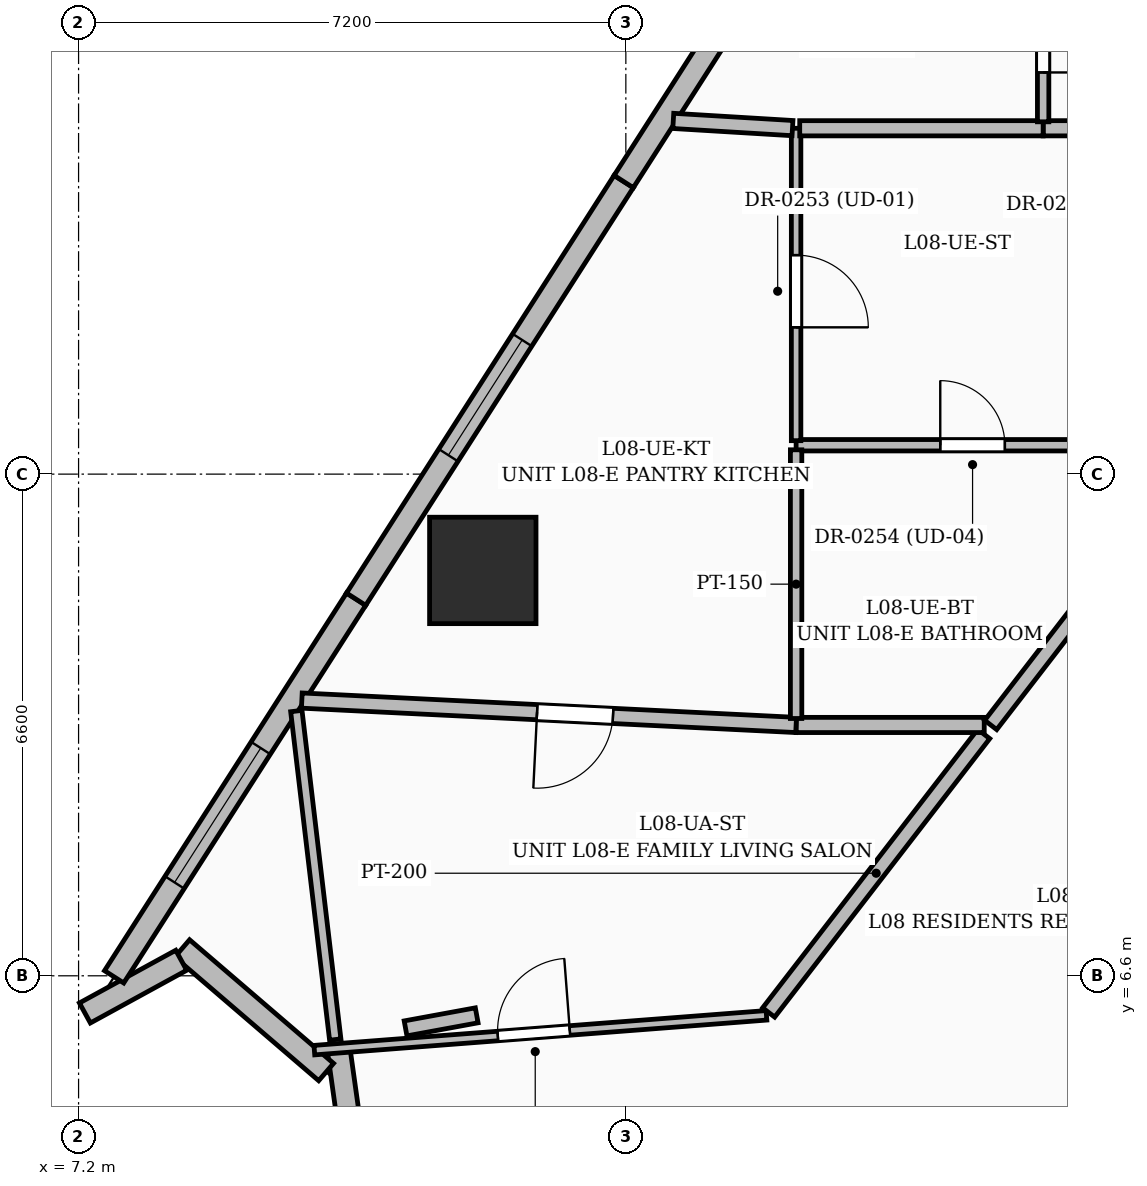
"""IFC4 building model, lengths in metres.
Left out: names, types, materials, properties, quantities, classifications, styles, units other than length and angle.
Written with IfcOpenShell. Run it as: python <this file> out.ifc"""

import sys

from ifc_helpers import new_model, si_unit, direction, frame, frame_2d, origin, origin_2d, place, context, subcontext, project, spatial, rectangle, extrude, element, fill, save


model = new_model("IFC4")
c1 = context("Model", 3, precision=1e-05, world=origin(), true_north=direction((0.0, 1.0)))
c2 = subcontext(c1, "Body", "Model", "MODEL_VIEW")
j1 = project(units=[si_unit("LENGTHUNIT", "METRE"), si_unit("PLANEANGLEUNIT", "RADIAN")], contexts=[c1])
p1 = place(None, origin())
s1 = spatial("IfcSite", under=j1, at=p1, CompositionType="ELEMENT")
p2 = place(p1, origin())
s2 = spatial("IfcBuilding", under=s1, at=p2, CompositionType="ELEMENT")
p3 = place(p2, frame((0.0, 0.0, 39.0)))
s3 = spatial("IfcBuildingStorey", under=s2, at=p3, CompositionType="ELEMENT", Elevation=39.0)
p4 = place(p3, frame((12.518, 11.933, 0.0), z_axis=(0.0, 0.0, 1.0), x_axis=(1.0, 0.0, 0.0)))
e1 = element("IfcColumn", 1, at=p4, inside=s3, PredefinedType="COLUMN", context=c2, shape_type="SweptSolid", body=[
    extrude(rectangle(XDim=1.4, YDim=1.4, at=origin_2d()), origin(), (0.0, 0.0, 1.0), 3.6),
])
p5 = place(p3, frame((11.044, 2.625, 0.0), z_axis=(0.0, 0.0, 1.0), x_axis=(-0.139123594989, 0.99027502509, 0.0)))
e2 = element("IfcWall", 2, at=p5, inside=s3, PredefinedType="SOLIDWALL", context=c2, shape_type="SweptSolid", body=[
    extrude(rectangle(XDim=3.05, YDim=0.3, at=frame_2d((1.525, 0.0))), origin(), (0.0, 0.0, 1.0), 3.35),
])
p6 = place(p5, frame((0.375, 0.0, 0.6)))
e3 = element("IfcOpeningElement", 3, at=p6, cuts=e2, PredefinedType="OPENING", context=c2, shape_type="SweptSolid", body=[
    extrude(rectangle(XDim=1.5, YDim=2.1, at=frame_2d((0.75, 1.05))), frame((0.0, 0.16, 0.0), z_axis=(0.0, -1.0, 0.0), x_axis=(1.0, 0.0, 0.0)), (0.0, 0.0, 1.0), 0.32),
])
p7 = place(p3, frame((10.457, 5.334, 0.0), z_axis=(0.0, 0.0, 1.0), x_axis=(-0.758710972352, 0.651427402273, 0.0)))
e4 = element("IfcWall", 4, at=p7, inside=s3, PredefinedType="SOLIDWALL", context=c2, shape_type="SweptSolid", body=[
    extrude(rectangle(XDim=2.496, YDim=0.3, at=frame_2d((1.248, 0.0))), origin(), (0.0, 0.0, 1.0), 3.35),
])
p8 = place(p3, frame((8.551, 6.804, 0.0), z_axis=(0.0, 0.0, 1.0), x_axis=(-0.877287752989, -0.479964788767, 0.0)))
e5 = element("IfcWall", 5, at=p8, inside=s3, PredefinedType="SOLIDWALL", context=c2, shape_type="SweptSolid", body=[
    extrude(rectangle(XDim=1.445, YDim=0.3, at=frame_2d((0.722, 0.0))), origin(), (0.0, 0.0, 1.0), 3.35),
])
p9 = place(p3, frame((7.668, 6.586, 0.0), z_axis=(0.0, 0.0, 1.0), x_axis=(0.539504449159, 0.841982748836, 0.0)))
e6 = element("IfcWall", 6, at=p9, inside=s3, PredefinedType="SOLIDWALL", context=c2, shape_type="SweptSolid", body=[
    extrude(rectangle(XDim=5.901, YDim=0.3, at=frame_2d((2.95, 0.0))), origin(), (0.0, 0.0, 1.0), 3.35),
])
p10 = place(p9, frame((1.475, 0.0, 0.55)))
e7 = element("IfcOpeningElement", 7, at=p10, cuts=e6, PredefinedType="OPENING", context=c2, shape_type="SweptSolid", body=[
    extrude(rectangle(XDim=2.1, YDim=2.4, at=frame_2d((1.05, 1.2))), frame((0.0, 0.16, 0.0), z_axis=(0.0, -1.0, 0.0), x_axis=(1.0, 0.0, 0.0)), (0.0, 0.0, 1.0), 0.32),
])
p11 = place(p3, frame((10.851, 11.555, 0.0), z_axis=(0.0, 0.0, 1.0), x_axis=(0.539526045631, 0.841968910403, 0.0)))
e8 = element("IfcWall", 8, at=p11, inside=s3, PredefinedType="SOLIDWALL", context=c2, shape_type="SweptSolid", body=[
    extrude(rectangle(XDim=6.526, YDim=0.3, at=frame_2d((3.263, 0.0))), origin(), (0.0, 0.0, 1.0), 3.35),
])
p12 = place(p11, frame((2.25, 0.0, 0.6)))
e9 = element("IfcOpeningElement", 9, at=p12, cuts=e8, PredefinedType="OPENING", context=c2, shape_type="SweptSolid", body=[
    extrude(rectangle(XDim=1.8, YDim=2.1, at=frame_2d((0.9, 1.05))), frame((0.0, 0.16, 0.0), z_axis=(0.0, -1.0, 0.0), x_axis=(1.0, 0.0, 0.0)), (0.0, 0.0, 1.0), 0.32),
])
p13 = place(p3, frame((14.372, 17.049, 0.0), z_axis=(0.0, 0.0, 1.0), x_axis=(0.539499522652, 0.841985905498, 0.0)))
e10 = element("IfcWall", 10, at=p13, inside=s3, PredefinedType="SOLIDWALL", context=c2, shape_type="SweptSolid", body=[
    extrude(rectangle(XDim=6.525, YDim=0.3, at=frame_2d((3.263, 0.0))), origin(), (0.0, 0.0, 1.0), 3.35),
])
p14 = place(p13, frame((4.175, 0.0, 0.8)))
e11 = element("IfcOpeningElement", 11, at=p14, cuts=e10, PredefinedType="OPENING", context=c2, shape_type="SweptSolid", body=[
    extrude(rectangle(XDim=1.2, YDim=1.8, at=frame_2d((0.6, 0.9))), frame((0.0, 0.16, 0.0), z_axis=(0.0, -1.0, 0.0), x_axis=(1.0, 0.0, 0.0)), (0.0, 0.0, 1.0), 0.32),
])
p15 = place(p3, frame((10.302, 5.622, 0.0), z_axis=(0.0, 0.0, 1.0), x_axis=(0.997048464094, 0.076774737046, 0.0)))
e12 = element("IfcWall", 12, at=p15, inside=s3, PredefinedType="PARTITIONING", context=c2, shape_type="SweptSolid", body=[
    extrude(rectangle(XDim=5.966, YDim=0.125, at=frame_2d((2.983, 0.0))), origin(), (0.0, 0.0, 1.0), 2.37),
])
p16 = place(p15, frame((2.421, 0.0, 0.0)))
e13 = element("IfcOpeningElement", 13, at=p16, cuts=e12, PredefinedType="OPENING", context=c2, shape_type="SweptSolid", body=[
    extrude(rectangle(XDim=0.95, YDim=2.2, at=frame_2d((0.475, 1.1))), frame((0.0, 0.072, 0.0), z_axis=(0.0, -1.0, 0.0), x_axis=(1.0, 0.0, 0.0)), (0.0, 0.0, 1.0), 0.145),
])
p17 = place(p3, frame((16.279, 6.118, 0.0), z_axis=(0.0, 0.0, 1.0), x_axis=(0.611231323246, 0.791452000745, 0.0)))
e14 = element("IfcWall", 14, at=p17, inside=s3, PredefinedType="PARTITIONING", context=c2, shape_type="SweptSolid", body=[
    extrude(rectangle(XDim=4.629, YDim=0.2, at=frame_2d((2.314, 0.0))), origin(), (0.0, 0.0, 1.0), 2.279),
])
p18 = place(p3, frame((19.115, 9.9, 0.0), z_axis=(0.0, 0.0, 1.0), x_axis=(-1.0, 0.0, 0.0)))
e15 = element("IfcWall", 15, at=p18, inside=s3, PredefinedType="PARTITIONING", context=c2, shape_type="SweptSolid", body=[
    extrude(rectangle(XDim=2.475, YDim=0.2, at=frame_2d((1.238, 0.0))), origin(), (0.0, 0.0, 1.0), 2.279),
])
p19 = place(p3, frame((16.64, 9.9, 0.0), z_axis=(0.0, 0.0, 1.0), x_axis=(-0.998783560552, 0.049309219933, 0.0)))
e16 = element("IfcWall", 16, at=p19, inside=s3, PredefinedType="PARTITIONING", context=c2, shape_type="SweptSolid", body=[
    extrude(rectangle(XDim=6.511, YDim=0.2, at=frame_2d((3.255, 0.0))), origin(), (0.0, 0.0, 1.0), 2.37),
])
p20 = place(p19, frame((2.412, 0.0, 0.0)))
e17 = element("IfcOpeningElement", 17, at=p20, cuts=e16, PredefinedType="OPENING", context=c2, shape_type="SweptSolid", body=[
    extrude(rectangle(XDim=1.0, YDim=2.2, at=frame_2d((0.5, 1.1))), frame((0.0, 0.11, 0.0), z_axis=(0.0, -1.0, 0.0), x_axis=(1.0, 0.0, 0.0)), (0.0, 0.0, 1.0), 0.22),
])
p21 = place(p3, frame((21.348, 12.683, 0.0), z_axis=(0.0, 0.0, 1.0), x_axis=(-0.611075844668, -0.791572051088, 0.0)))
e18 = element("IfcWall", 18, at=p21, inside=s3, PredefinedType="PARTITIONING", context=c2, shape_type="SweptSolid", body=[
    extrude(rectangle(XDim=3.515, YDim=0.2, at=frame_2d((1.758, 0.0))), origin(), (0.0, 0.0, 1.0), 2.279),
])
p22 = place(p3, frame((16.64, 13.58, 0.0), z_axis=(0.0, 0.0, 1.0), x_axis=(1.0, 0.0, 0.0)))
e19 = element("IfcWall", 19, at=p22, inside=s3, PredefinedType="PARTITIONING", context=c2, shape_type="SweptSolid", body=[
    extrude(rectangle(XDim=4.675, YDim=0.15, at=frame_2d((2.337, 0.0))), origin(), (0.0, 0.0, 1.0), 2.771),
])
p23 = place(p22, frame((1.896, 0.0, 0.0)))
e20 = element("IfcOpeningElement", 20, at=p23, cuts=e19, PredefinedType="OPENING", context=c2, shape_type="SweptSolid", body=[
    extrude(rectangle(XDim=0.85, YDim=2.1, at=frame_2d((0.425, 1.05))), frame((0.0, 0.085, 0.0), z_axis=(0.0, -1.0, 0.0), x_axis=(1.0, 0.0, 0.0)), (0.0, 0.0, 1.0), 0.17),
])
p24 = place(p3, frame((16.64, 17.75, 0.0), z_axis=(0.0, 0.0, 1.0), x_axis=(0.0, -1.0, 0.0)))
e21 = element("IfcWall", 21, at=p24, inside=s3, PredefinedType="PARTITIONING", context=c2, shape_type="SweptSolid", body=[
    extrude(rectangle(XDim=4.11, YDim=0.125, at=frame_2d((2.055, 0.0))), origin(), (0.0, 0.0, 1.0), 3.35),
])
p25 = place(p24, frame((1.669, 0.0, 0.0)))
e22 = element("IfcOpeningElement", 22, at=p25, cuts=e21, PredefinedType="OPENING", context=c2, shape_type="SweptSolid", body=[
    extrude(rectangle(XDim=0.95, YDim=2.2, at=frame_2d((0.475, 1.1))), frame((0.0, 0.072, 0.0), z_axis=(0.0, -1.0, 0.0), x_axis=(1.0, 0.0, 0.0)), (0.0, 0.0, 1.0), 0.145),
])
p26 = place(p3, frame((21.315, 17.75, 0.0), z_axis=(0.0, 0.0, 1.0), x_axis=(-1.0, 0.0, 0.0)))
e23 = element("IfcWall", 23, at=p26, inside=s3, PredefinedType="PARTITIONING", context=c2, shape_type="SweptSolid", body=[
    extrude(rectangle(XDim=1.425, YDim=0.2, at=frame_2d((0.712, 0.0))), origin(), (0.0, 0.0, 1.0), 2.771),
])
p27 = place(p3, frame((19.89, 17.75, 0.0), z_axis=(0.0, 0.0, 1.0), x_axis=(-1.0, 0.0, 0.0)))
e24 = element("IfcWall", 24, at=p27, inside=s3, PredefinedType="PARTITIONING", context=c2, shape_type="SweptSolid", body=[
    extrude(rectangle(XDim=3.202, YDim=0.2, at=frame_2d((1.601, 0.0))), origin(), (0.0, 0.0, 1.0), 3.35),
])
p28 = place(p3, frame((16.64, 13.52, 0.0), z_axis=(0.0, 0.0, 1.0), x_axis=(0.0, -1.0, 0.0)))
e25 = element("IfcWall", 25, at=p28, inside=s3, PredefinedType="PARTITIONING", context=c2, shape_type="SweptSolid", body=[
    extrude(rectangle(XDim=3.535, YDim=0.15, at=frame_2d((1.768, 0.0))), origin(), (0.0, 0.0, 1.0), 2.279),
])
p29 = place(p3, frame((16.593, 17.752, 0.0), z_axis=(0.0, 0.0, 1.0), x_axis=(-0.998181550188, 0.060279290502, 0.0)))
e26 = element("IfcWall", 26, at=p29, inside=s3, PredefinedType="PARTITIONING", context=c2, shape_type="SweptSolid", body=[
    extrude(rectangle(XDim=1.572, YDim=0.2, at=frame_2d((0.786, 0.0))), origin(), (0.0, 0.0, 1.0), 2.37),
])
p30 = place(p3, frame((19.89, 19.95, 0.0), z_axis=(0.0, 0.0, 1.0), x_axis=(0.0, -1.0, 0.0)))
e27 = element("IfcWall", 27, at=p30, inside=s3, PredefinedType="PARTITIONING", context=c2, shape_type="SweptSolid", body=[
    extrude(rectangle(XDim=2.115, YDim=0.15, at=frame_2d((1.058, 0.0))), origin(), (0.0, 0.0, 1.0), 3.35),
])
p31 = place(p30, frame((0.615, 0.0, 0.0)))
e28 = element("IfcOpeningElement", 28, at=p31, cuts=e27, PredefinedType="OPENING", context=c2, shape_type="SweptSolid", body=[
    extrude(rectangle(XDim=0.85, YDim=2.1, at=frame_2d((0.425, 1.05))), frame((0.0, 0.085, 0.0), z_axis=(0.0, -1.0, 0.0), x_axis=(1.0, 0.0, 0.0)), (0.0, 0.0, 1.0), 0.17),
])
p32 = place(p3, frame((11.502, 5.908, 0.0), z_axis=(0.0, 0.0, 1.0), x_axis=(0.983510869315, 0.180849025265, 0.0)))
e29 = element("IfcWall", 29, at=p32, inside=s3, PredefinedType="PARTITIONING", context=c2, shape_type="SweptSolid", body=[
    extrude(rectangle(XDim=0.952, YDim=0.2, at=frame_2d((0.476, 0.0))), origin(), (0.0, 0.0, 1.0), 3.35),
])
p33 = place(p3, frame((10.577, 5.761, 0.0), z_axis=(0.0, 0.0, 1.0), x_axis=(-0.117632098524, 0.993057243766, 0.0)))
e30 = element("IfcWall", 30, at=p33, inside=s3, PredefinedType="PARTITIONING", context=c2, shape_type="SweptSolid", body=[
    extrude(rectangle(XDim=4.352, YDim=0.15, at=frame_2d((2.176, 0.0))), origin(), (0.0, 0.0, 1.0), 3.35),
])
p34 = place(p10, origin())
e31 = element("IfcWindow", 31, at=p34, inside=s3, PartitioningType="SINGLE_PANEL", PredefinedType="WINDOW", context=c2, shape_type="SweptSolid", body=[
    extrude(rectangle(XDim=2.1, YDim=2.4, at=frame_2d((1.05, 1.2))), frame((0.0, 0.03, 0.0), z_axis=(0.0, -1.0, 0.0), x_axis=(1.0, 0.0, 0.0)), (0.0, 0.0, 1.0), 0.06),
])
fill(e7, e31)
p35 = place(p12, origin())
e32 = element("IfcWindow", 32, at=p35, inside=s3, PartitioningType="SINGLE_PANEL", PredefinedType="WINDOW", context=c2, shape_type="SweptSolid", body=[
    extrude(rectangle(XDim=1.8, YDim=2.1, at=frame_2d((0.9, 1.05))), frame((0.0, 0.03, 0.0), z_axis=(0.0, -1.0, 0.0), x_axis=(1.0, 0.0, 0.0)), (0.0, 0.0, 1.0), 0.06),
])
fill(e9, e32)
p36 = place(p16, origin())
e33 = element("IfcDoor", 33, at=p36, inside=s3, OperationType="SINGLE_SWING_RIGHT", PredefinedType="DOOR", context=c2, shape_type="SweptSolid", body=[
    extrude(rectangle(XDim=0.95, YDim=2.2, at=frame_2d((0.475, 1.1))), frame((0.0, 0.025, 0.0), z_axis=(0.0, -1.0, 0.0), x_axis=(1.0, 0.0, 0.0)), (0.0, 0.0, 1.0), 0.05),
])
fill(e13, e33)
p37 = place(p25, origin())
e34 = element("IfcDoor", 34, at=p37, inside=s3, OperationType="SINGLE_SWING_RIGHT", PredefinedType="DOOR", context=c2, shape_type="SweptSolid", body=[
    extrude(rectangle(XDim=0.95, YDim=2.2, at=frame_2d((0.475, 1.1))), frame((0.0, 0.025, 0.0), z_axis=(0.0, -1.0, 0.0), x_axis=(1.0, 0.0, 0.0)), (0.0, 0.0, 1.0), 0.05),
])
fill(e22, e34)
p38 = place(p23, origin())
e35 = element("IfcDoor", 35, at=p38, inside=s3, OperationType="SINGLE_SWING_LEFT", PredefinedType="DOOR", context=c2, shape_type="SweptSolid", body=[
    extrude(rectangle(XDim=0.85, YDim=2.1, at=frame_2d((0.425, 1.05))), frame((0.0, 0.025, 0.0), z_axis=(0.0, -1.0, 0.0), x_axis=(1.0, 0.0, 0.0)), (0.0, 0.0, 1.0), 0.05),
])
fill(e20, e35)
p39 = place(p31, origin())
e36 = element("IfcDoor", 36, at=p39, inside=s3, OperationType="SINGLE_SWING_RIGHT", PredefinedType="DOOR", context=c2, shape_type="SweptSolid", body=[
    extrude(rectangle(XDim=0.85, YDim=2.1, at=frame_2d((0.425, 1.05))), frame((0.0, 0.025, 0.0), z_axis=(0.0, -1.0, 0.0), x_axis=(1.0, 0.0, 0.0)), (0.0, 0.0, 1.0), 0.05),
])
fill(e28, e36)
p40 = place(p20, origin())
e37 = element("IfcDoor", 37, at=p40, inside=s3, OperationType="SINGLE_SWING_RIGHT", PredefinedType="DOOR", context=c2, shape_type="SweptSolid", body=[
    extrude(rectangle(XDim=1.0, YDim=2.2, at=frame_2d((0.5, 1.1))), frame((0.0, 0.025, 0.0), z_axis=(0.0, -1.0, 0.0), x_axis=(1.0, 0.0, 0.0)), (0.0, 0.0, 1.0), 0.05),
])
fill(e17, e37)
save(model, sys.argv[1])
